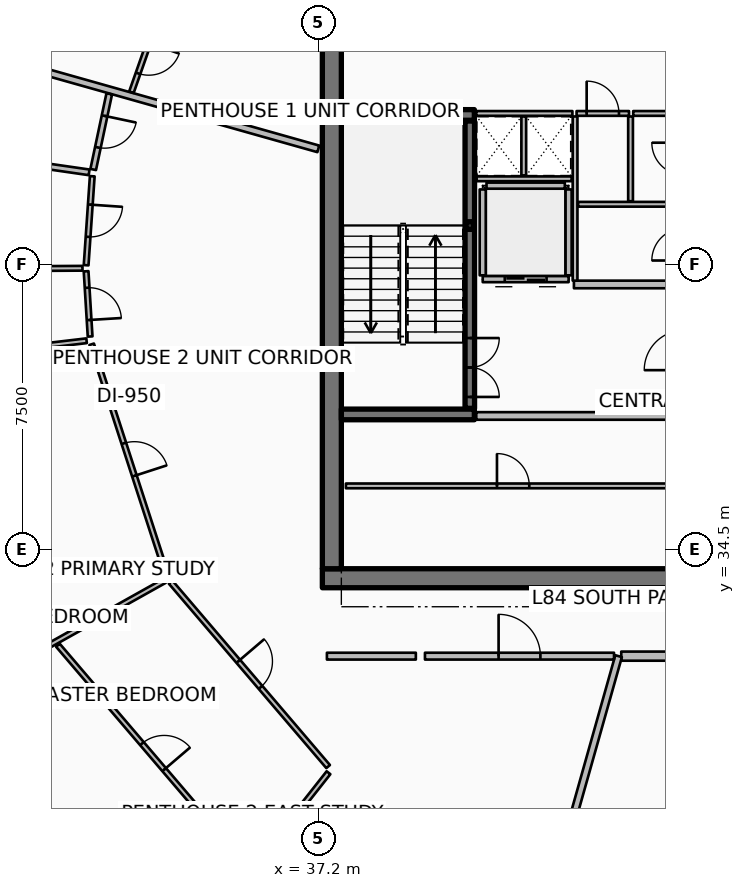
"""IFC4 building model, lengths in metres.
Left out: names, types, materials, properties, quantities, classifications, styles, units other than length and angle.
Written with IfcOpenShell. Run it as: python <this file> out.ifc"""

import sys

from ifc_helpers import new_model, si_unit, direction, frame, frame_2d, origin, origin_2d, place, context, subcontext, project, spatial, rectangle, hollow_rectangle, extrude, element, fill, save


model = new_model("IFC4")
c1 = context("Model", 3, precision=1e-05, world=origin(), true_north=direction((0.0, 1.0)))
c2 = subcontext(c1, "Body", "Model", "MODEL_VIEW")
j1 = project(units=[si_unit("LENGTHUNIT", "METRE"), si_unit("PLANEANGLEUNIT", "RADIAN")], contexts=[c1])
p1 = place(None, origin())
s1 = spatial("IfcSite", under=j1, at=p1, CompositionType="ELEMENT")
p2 = place(p1, origin())
s2 = spatial("IfcBuilding", under=s1, at=p2, CompositionType="ELEMENT")
p3 = place(p2, frame((0.0, 0.0, 334.7)))
s3 = spatial("IfcBuildingStorey", under=s2, at=p3, CompositionType="ELEMENT", Elevation=334.7)
p4 = place(p3, frame((37.3, 33.75, 0.0), z_axis=(0.0, 0.0, 1.0), x_axis=(1.0, 0.0, 0.0)))
e1 = element("IfcWall", 1, at=p4, inside=s3, PredefinedType="SHEAR", context=c2, shape_type="SweptSolid", body=[
    extrude(rectangle(XDim=9.6, YDim=0.5, at=frame_2d((4.8, 0.0))), origin(), (0.0, 0.0, 1.0), 4.2),
])
p5 = place(p3, frame((37.55, 34.0, 0.0), z_axis=(0.0, 0.0, 1.0), x_axis=(0.0, 1.0, 0.0)))
e2 = element("IfcWall", 2, at=p5, inside=s3, PredefinedType="SHEAR", context=c2, shape_type="SweptSolid", body=[
    extrude(rectangle(XDim=16.0, YDim=0.5, at=frame_2d((8.0, 0.0))), origin(), (0.0, 0.0, 1.0), 4.2),
])
for number, where, z_axis, x_axis in (
    (3, (37.8, 38.06, 0.0), (0.0, 0.0, 1.0), (1.0, 0.0, 0.0)),
    (4, (37.8, 45.94, 0.0), (0.0, 0.0, 1.0), (1.0, 0.0, 0.0)),
):
    element("IfcWall", number, at=place(p3, frame(where, z_axis=z_axis, x_axis=x_axis)), inside=s3, PredefinedType="SHEAR", context=c2, shape_type="SweptSolid", body=[
        extrude(rectangle(XDim=3.5, YDim=0.28, at=frame_2d((1.75, 0.0))), origin(), (0.0, 0.0, 1.0), 4.2),
    ])
p6 = place(p3, frame((41.18, 43.03, 0.0), z_axis=(0.0, 0.0, 1.0), x_axis=(1.0, 0.0, 0.0)))
e5 = element("IfcColumn", 5, at=p6, inside=s3, PredefinedType="COLUMN", context=c2, shape_type="SweptSolid", body=[
    extrude(hollow_rectangle(XDim=0.2, YDim=0.2, WallThickness=0.01, InnerFilletRadius=0.01, OuterFilletRadius=0.02, at=origin_2d()), origin(), (0.0, 0.0, 1.0), 1.895),
])
p7 = place(p3, frame((41.18, 38.22, 0.0), z_axis=(0.0, 0.0, 1.0), x_axis=(0.0, 1.0, 0.0)))
e6 = element("IfcWall", 6, at=p7, inside=s3, PredefinedType="SOLIDWALL", context=c2, shape_type="SweptSolid", body=[
    extrude(rectangle(XDim=7.56, YDim=0.25, at=frame_2d((3.78, 0.0))), origin(), (0.0, 0.0, 1.0), 3.94),
])
p8 = place(p7, frame((0.3, 0.0, 0.0)))
e7 = element("IfcOpeningElement", 7, at=p8, cuts=e6, PredefinedType="OPENING", context=c2, shape_type="SweptSolid", body=[
    extrude(rectangle(XDim=1.55, YDim=2.15, at=frame_2d((0.775, 1.075))), frame((0.0, 0.135, 0.0), z_axis=(0.0, -1.0, 0.0), x_axis=(1.0, 0.0, 0.0)), (0.0, 0.0, 1.0), 0.27),
])
p9 = place(p3, frame((43.78, 41.62, 0.0), z_axis=(0.0, 0.0, 1.0), x_axis=(-1.0, 0.0, 0.0)))
e8 = element("IfcWall", 8, at=p9, inside=s3, PredefinedType="PARTITIONING", context=c2, shape_type="SweptSolid", body=[
    extrude(rectangle(XDim=2.26, YDim=0.16, at=frame_2d((1.13, 0.0))), origin(), (0.0, 0.0, 1.0), 3.94),
])
p10 = place(p9, frame((0.58, 0.0, 0.0)))
e9 = element("IfcOpeningElement", 9, at=p10, cuts=e8, PredefinedType="OPENING", context=c2, shape_type="SweptSolid", body=[
    extrude(rectangle(XDim=1.1, YDim=2.1, at=frame_2d((0.55, 1.05))), frame((0.0, 0.09, 0.0), z_axis=(0.0, -1.0, 0.0), x_axis=(1.0, 0.0, 0.0)), (0.0, 0.0, 1.0), 0.18),
])
for number, where, z_axis, x_axis in (
    (10, (43.78, 41.72, 0.0), (0.0, 0.0, 1.0), (0.0, 1.0, 0.0)),
    (11, (41.52, 41.72, 0.0), (0.0, 0.0, 1.0), (0.0, 1.0, 0.0)),
):
    element("IfcWall", number, at=place(p3, frame(where, z_axis=z_axis, x_axis=x_axis)), inside=s3, PredefinedType="PARTITIONING", context=c2, shape_type="SweptSolid", body=[
        extrude(rectangle(XDim=2.26, YDim=0.16, at=frame_2d((1.13, 0.0))), origin(), (0.0, 0.0, 1.0), 3.94),
    ])
p11 = place(p3, frame((41.62, 44.08, 0.0), z_axis=(0.0, 0.0, 1.0), x_axis=(1.0, 0.0, 0.0)))
e12 = element("IfcWall", 12, at=p11, inside=s3, PredefinedType="PARTITIONING", context=c2, shape_type="SweptSolid", body=[
    extrude(rectangle(XDim=2.06, YDim=0.16, at=frame_2d((1.03, 0.0))), origin(), (0.0, 0.0, 1.0), 3.94),
])
p12 = place(p3, frame((37.92, 36.18, 0.0), z_axis=(0.0, 0.0, 1.0), x_axis=(1.0, 0.0, 0.0)))
e13 = element("IfcWall", 13, at=p12, inside=s3, PredefinedType="PARTITIONING", context=c2, shape_type="SweptSolid", body=[
    extrude(rectangle(XDim=8.8, YDim=0.125, at=frame_2d((4.4, 0.0))), origin(), (0.0, 0.0, 1.0), 3.38),
])
p13 = place(p12, frame((3.975, 0.0, 0.0)))
e14 = element("IfcOpeningElement", 14, at=p13, cuts=e13, PredefinedType="OPENING", context=c2, shape_type="SweptSolid", body=[
    extrude(rectangle(XDim=0.85, YDim=2.06, at=frame_2d((0.425, 1.03))), frame((0.0, 0.073, 0.0), z_axis=(0.0, -1.0, 0.0), x_axis=(1.0, 0.0, 0.0)), (0.0, 0.0, 1.0), 0.145),
])
p14 = place(p3, frame((41.35, 38.02, 0.0), z_axis=(0.0, 0.0, 1.0), x_axis=(1.0, 0.0, 0.0)))
e15 = element("IfcWall", 15, at=p14, inside=s3, PredefinedType="PARTITIONING", context=c2, shape_type="SweptSolid", body=[
    extrude(rectangle(XDim=5.37, YDim=0.2, at=frame_2d((2.685, 0.0))), origin(), (0.0, 0.0, 1.0), 3.94),
])
p15 = place(p3, frame((43.92, 41.48, 0.0), z_axis=(0.0, 0.0, 1.0), x_axis=(1.0, 0.0, 0.0)))
e16 = element("IfcWall", 16, at=p15, inside=s3, PredefinedType="PARTITIONING", context=c2, shape_type="SweptSolid", body=[
    extrude(rectangle(XDim=2.8, YDim=0.2, at=frame_2d((1.4, 0.0))), origin(), (0.0, 0.0, 1.0), 3.94),
])
p16 = place(p3, frame((41.36, 44.26, 0.0), z_axis=(0.0, 0.0, 1.0), x_axis=(1.0, 0.0, 0.0)))
e17 = element("IfcWall", 17, at=p16, inside=s3, PredefinedType="PARTITIONING", context=c2, shape_type="SweptSolid", body=[
    extrude(rectangle(XDim=2.5, YDim=0.125, at=frame_2d((1.25, 0.0))), origin(), (0.0, 0.0, 1.0), 3.38),
])
p17 = place(p3, frame((42.6, 44.35, 0.0), z_axis=(0.0, 0.0, 1.0), x_axis=(0.0, 1.0, 0.0)))
e18 = element("IfcWall", 18, at=p17, inside=s3, PredefinedType="PARTITIONING", context=c2, shape_type="SweptSolid", body=[
    extrude(rectangle(XDim=1.55, YDim=0.125, at=frame_2d((0.775, 0.0))), origin(), (0.0, 0.0, 1.0), 3.38),
])
p18 = place(p3, frame((43.95, 41.58, 0.0), z_axis=(0.0, 0.0, 1.0), x_axis=(0.0, 1.0, 0.0)))
e19 = element("IfcWall", 19, at=p18, inside=s3, PredefinedType="PARTITIONING", context=c2, shape_type="SweptSolid", body=[
    extrude(rectangle(XDim=4.32, YDim=0.125, at=frame_2d((2.16, 0.0))), origin(), (0.0, 0.0, 1.0), 3.38),
])
p19 = place(p3, frame((44.03, 43.59, 0.0), z_axis=(0.0, 0.0, 1.0), x_axis=(1.0, 0.0, 0.0)))
e20 = element("IfcWall", 20, at=p19, inside=s3, PredefinedType="PARTITIONING", context=c2, shape_type="SweptSolid", body=[
    extrude(rectangle(XDim=2.71, YDim=0.125, at=frame_2d((1.355, 0.0))), origin(), (0.0, 0.0, 1.0), 3.38),
])
p20 = place(p3, frame((45.41, 43.67, 0.0), z_axis=(0.0, 0.0, 1.0), x_axis=(0.0, 1.0, 0.0)))
e21 = element("IfcWall", 21, at=p20, inside=s3, PredefinedType="PARTITIONING", context=c2, shape_type="SweptSolid", body=[
    extrude(rectangle(XDim=2.23, YDim=0.125, at=frame_2d((1.115, 0.0))), origin(), (0.0, 0.0, 1.0), 3.38),
])
p21 = place(p3, frame((41.35, 45.98, 0.0), z_axis=(0.0, 0.0, 1.0), x_axis=(1.0, 0.0, 0.0)))
e22 = element("IfcWall", 22, at=p21, inside=s3, PredefinedType="PARTITIONING", context=c2, shape_type="SweptSolid", body=[
    extrude(rectangle(XDim=2.53, YDim=0.125, at=frame_2d((1.265, 0.0))), origin(), (0.0, 0.0, 1.0), 3.38),
])
p22 = place(p3, frame((43.99, 45.98, 0.0), z_axis=(0.0, 0.0, 1.0), x_axis=(1.0, 0.0, 0.0)))
e23 = element("IfcWall", 23, at=p22, inside=s3, PredefinedType="PARTITIONING", context=c2, shape_type="SweptSolid", body=[
    extrude(rectangle(XDim=1.38, YDim=0.125, at=frame_2d((0.69, 0.0))), origin(), (0.0, 0.0, 1.0), 3.38),
])
p23 = place(p22, frame((0.265, 0.0, 0.0)))
e24 = element("IfcOpeningElement", 24, at=p23, cuts=e23, PredefinedType="OPENING", context=c2, shape_type="SweptSolid", body=[
    extrude(rectangle(XDim=0.85, YDim=2.06, at=frame_2d((0.425, 1.03))), frame((0.0, 0.073, 0.0), z_axis=(0.0, -1.0, 0.0), x_axis=(1.0, 0.0, 0.0)), (0.0, 0.0, 1.0), 0.145),
])
p24 = place(p3, frame((45.48, 45.98, 0.0), z_axis=(0.0, 0.0, 1.0), x_axis=(1.0, 0.0, 0.0)))
e25 = element("IfcWall", 25, at=p24, inside=s3, PredefinedType="PARTITIONING", context=c2, shape_type="SweptSolid", body=[
    extrude(rectangle(XDim=1.26, YDim=0.125, at=frame_2d((0.63, 0.0))), origin(), (0.0, 0.0, 1.0), 3.38),
])
p25 = place(p3, frame((45.165, 31.7, 0.0), z_axis=(0.0, 0.0, 1.0), x_axis=(1.0, 0.0, 0.0)))
e26 = element("IfcWall", 26, at=p25, inside=s3, PredefinedType="SOLIDWALL", context=c2, shape_type="SweptSolid", body=[
    extrude(rectangle(XDim=8.533, YDim=0.24, at=frame_2d((4.267, 0.0))), origin(), (0.0, 0.0, 1.0), 3.38),
])
p26 = place(p3, frame((37.194, 45.048, 0.0), z_axis=(0.0, 0.0, 1.0), x_axis=(-0.962457024049, 0.271434111451, 0.0)))
e27 = element("IfcWall", 27, at=p26, inside=s3, PredefinedType="PARTITIONING", context=c2, shape_type="SweptSolid", body=[
    extrude(rectangle(XDim=13.799, YDim=0.18, at=frame_2d((6.9, 0.0))), origin(), (0.0, 0.0, 1.0), 3.38),
])
p27 = place(p3, frame((45.095, 31.7, 0.0), z_axis=(0.0, 0.0, 1.0), x_axis=(-0.271453030279, -0.962451688321, 0.0)))
e28 = element("IfcWall", 28, at=p27, inside=s3, PredefinedType="PARTITIONING", context=c2, shape_type="SweptSolid", body=[
    extrude(rectangle(XDim=12.191, YDim=0.18, at=frame_2d((6.096, 0.0))), origin(), (0.0, 0.0, 1.0), 3.38),
])
p28 = place(p3, frame((32.907, 48.332, 0.0), z_axis=(0.0, 0.0, 1.0), x_axis=(-0.332128336942, -0.943234206229, 0.0)))
e29 = element("IfcWall", 29, at=p28, inside=s3, PredefinedType="PARTITIONING", context=c2, shape_type="SweptSolid", body=[
    extrude(rectangle(XDim=1.902, YDim=0.125, at=frame_2d((0.951, 0.0))), origin(), (0.0, 0.0, 1.0), 3.38),
])
p29 = place(p28, frame((0.526, 0.0, 0.0)))
e30 = element("IfcOpeningElement", 30, at=p29, cuts=e29, PredefinedType="OPENING", context=c2, shape_type="SweptSolid", body=[
    extrude(rectangle(XDim=0.85, YDim=2.06, at=frame_2d((0.425, 1.03))), frame((0.0, 0.073, 0.0), z_axis=(0.0, -1.0, 0.0), x_axis=(1.0, 0.0, 0.0)), (0.0, 0.0, 1.0), 0.145),
])
p30 = place(p3, frame((40.0, 31.7, 0.0), z_axis=(0.0, 0.0, 1.0), x_axis=(1.0, 0.0, 0.0)))
e31 = element("IfcWall", 31, at=p30, inside=s3, PredefinedType="PARTITIONING", context=c2, shape_type="SweptSolid", body=[
    extrude(rectangle(XDim=4.975, YDim=0.18, at=frame_2d((2.488, 0.0))), origin(), (0.0, 0.0, 1.0), 3.38),
])
p31 = place(p30, frame((1.938, 0.0, 0.0)))
e32 = element("IfcOpeningElement", 32, at=p31, cuts=e31, PredefinedType="OPENING", context=c2, shape_type="SweptSolid", body=[
    extrude(rectangle(XDim=1.1, YDim=2.1, at=frame_2d((0.55, 1.05))), frame((0.0, 0.1, 0.0), z_axis=(0.0, -1.0, 0.0), x_axis=(1.0, 0.0, 0.0)), (0.0, 0.0, 1.0), 0.2),
])
p32 = place(p3, frame((31.692, 46.496, 0.0), z_axis=(0.0, 0.0, 1.0), x_axis=(-0.207455496804, -0.978244456588, 0.0)))
e33 = element("IfcWall", 33, at=p32, inside=s3, PredefinedType="PARTITIONING", context=c2, shape_type="SweptSolid", body=[
    extrude(rectangle(XDim=2.035, YDim=0.15, at=frame_2d((1.017, 0.0))), origin(), (0.0, 0.0, 1.0), 3.38),
])
p33 = place(p32, frame((0.592, 0.0, 0.0)))
e34 = element("IfcOpeningElement", 34, at=p33, cuts=e33, PredefinedType="OPENING", context=c2, shape_type="SweptSolid", body=[
    extrude(rectangle(XDim=0.85, YDim=2.06, at=frame_2d((0.425, 1.03))), frame((0.0, 0.085, 0.0), z_axis=(0.0, -1.0, 0.0), x_axis=(1.0, 0.0, 0.0)), (0.0, 0.0, 1.0), 0.17),
])
p34 = place(p3, frame((31.162, 44.43, 0.0), z_axis=(0.0, 0.0, 1.0), x_axis=(-0.989744304981, 0.142850308916, 0.0)))
e35 = element("IfcWall", 35, at=p34, inside=s3, PredefinedType="PARTITIONING", context=c2, shape_type="SweptSolid", body=[
    extrude(rectangle(XDim=4.09, YDim=0.15, at=frame_2d((2.045, 0.0))), origin(), (0.0, 0.0, 1.0), 3.38),
])
p35 = place(p3, frame((30.988, 41.906, 0.0), z_axis=(0.0, 0.0, 1.0), x_axis=(-0.999984908948, -0.005493803382, 0.0)))
e36 = element("IfcWall", 36, at=p35, inside=s3, PredefinedType="PARTITIONING", context=c2, shape_type="SweptSolid", body=[
    extrude(rectangle(XDim=8.666, YDim=0.125, at=frame_2d((4.333, 0.0))), origin(), (0.0, 0.0, 1.0), 3.38),
])
p36 = place(p3, frame((31.245, 44.327, 0.0), z_axis=(0.0, 0.0, 1.0), x_axis=(-0.068873502497, -0.997625400967, 0.0)))
e37 = element("IfcWall", 37, at=p36, inside=s3, PredefinedType="PARTITIONING", context=c2, shape_type="SweptSolid", body=[
    extrude(rectangle(XDim=2.347, YDim=0.125, at=frame_2d((1.173, 0.0))), origin(), (0.0, 0.0, 1.0), 3.38),
])
p37 = place(p36, frame((0.748, 0.0, 0.0)))
e38 = element("IfcOpeningElement", 38, at=p37, cuts=e37, PredefinedType="OPENING", context=c2, shape_type="SweptSolid", body=[
    extrude(rectangle(XDim=0.85, YDim=2.06, at=frame_2d((0.425, 1.03))), frame((0.0, 0.073, 0.0), z_axis=(0.0, -1.0, 0.0), x_axis=(1.0, 0.0, 0.0)), (0.0, 0.0, 1.0), 0.145),
])
p38 = place(p3, frame((31.083, 41.827, 0.0), z_axis=(0.0, 0.0, 1.0), x_axis=(0.061626842896, -0.998099259711, 0.0)))
e39 = element("IfcWall", 39, at=p38, inside=s3, PredefinedType="PARTITIONING", context=c2, shape_type="SweptSolid", body=[
    extrude(rectangle(XDim=1.719, YDim=0.125, at=frame_2d((0.86, 0.0))), origin(), (0.0, 0.0, 1.0), 3.38),
])
p39 = place(p38, frame((0.435, 0.0, 0.0)))
e40 = element("IfcOpeningElement", 40, at=p39, cuts=e39, PredefinedType="OPENING", context=c2, shape_type="SweptSolid", body=[
    extrude(rectangle(XDim=0.85, YDim=2.06, at=frame_2d((0.425, 1.03))), frame((0.0, 0.073, 0.0), z_axis=(0.0, -1.0, 0.0), x_axis=(1.0, 0.0, 0.0)), (0.0, 0.0, 1.0), 0.145),
])
p40 = place(p3, frame((31.096, 39.999, 0.0), z_axis=(0.0, 0.0, 1.0), x_axis=(-0.993069250604, -0.117530691761, 0.0)))
e41 = element("IfcWall", 41, at=p40, inside=s3, PredefinedType="PARTITIONING", context=c2, shape_type="SweptSolid", body=[
    extrude(rectangle(XDim=8.814, YDim=0.125, at=frame_2d((4.407, 0.0))), origin(), (0.0, 0.0, 1.0), 3.38),
])
p41 = place(p3, frame((31.229, 39.906, 0.0), z_axis=(0.0, 0.0, 1.0), x_axis=(0.309023798792, -0.951054305379, 0.0)))
e42 = element("IfcWall", 42, at=p41, inside=s3, PredefinedType="PARTITIONING", context=c2, shape_type="SweptSolid", body=[
    extrude(rectangle(XDim=6.383, YDim=0.125, at=frame_2d((3.191, 0.0))), origin(), (0.0, 0.0, 1.0), 3.38),
])
p42 = place(p41, frame((2.741, 0.0, 0.0)))
e43 = element("IfcOpeningElement", 43, at=p42, cuts=e42, PredefinedType="OPENING", context=c2, shape_type="SweptSolid", body=[
    extrude(rectangle(XDim=0.9, YDim=2.08, at=frame_2d((0.45, 1.04))), frame((0.0, 0.073, 0.0), z_axis=(0.0, -1.0, 0.0), x_axis=(1.0, 0.0, 0.0)), (0.0, 0.0, 1.0), 0.145),
])
p43 = place(p3, frame((37.42, 31.7, 0.0), z_axis=(0.0, 0.0, 1.0), x_axis=(1.0, 0.0, 0.0)))
e44 = element("IfcWall", 44, at=p43, inside=s3, PredefinedType="PARTITIONING", context=c2, shape_type="SweptSolid", body=[
    extrude(rectangle(XDim=2.34, YDim=0.18, at=frame_2d((1.17, 0.0))), origin(), (0.0, 0.0, 1.0), 3.38),
])
p44 = place(p3, frame((33.148, 33.683, 0.0), z_axis=(0.0, 0.0, 1.0), x_axis=(-0.872504598877, -0.488605899409, 0.0)))
e45 = element("IfcWall", 45, at=p44, inside=s3, PredefinedType="PARTITIONING", context=c2, shape_type="SweptSolid", body=[
    extrude(rectangle(XDim=8.814, YDim=0.125, at=frame_2d((4.407, 0.0))), origin(), (0.0, 0.0, 1.0), 3.38),
])
p45 = place(p3, frame((37.462, 28.632, 0.0), z_axis=(0.0, 0.0, 1.0), x_axis=(-0.619099165969, -0.78531281837, 0.0)))
e46 = element("IfcWall", 46, at=p45, inside=s3, PredefinedType="PARTITIONING", context=c2, shape_type="SweptSolid", body=[
    extrude(rectangle(XDim=8.105, YDim=0.125, at=frame_2d((4.052, 0.0))), origin(), (0.0, 0.0, 1.0), 3.38),
])
p46 = place(p3, frame((33.307, 33.648, 0.0), z_axis=(0.0, 0.0, 1.0), x_axis=(0.649467421322, -0.760389419075, 0.0)))
e47 = element("IfcWall", 47, at=p46, inside=s3, PredefinedType="PARTITIONING", context=c2, shape_type="SweptSolid", body=[
    extrude(rectangle(XDim=6.383, YDim=0.125, at=frame_2d((3.191, 0.0))), origin(), (0.0, 0.0, 1.0), 3.38),
])
p47 = place(p46, frame((2.741, 0.0, 0.0)))
e48 = element("IfcOpeningElement", 48, at=p47, cuts=e47, PredefinedType="OPENING", context=c2, shape_type="SweptSolid", body=[
    extrude(rectangle(XDim=0.9, YDim=2.08, at=frame_2d((0.45, 1.04))), frame((0.0, 0.073, 0.0), z_axis=(0.0, -1.0, 0.0), x_axis=(1.0, 0.0, 0.0)), (0.0, 0.0, 1.0), 0.145),
])
p48 = place(p3, frame((30.341, 31.987, 0.0), z_axis=(0.0, 0.0, 1.0), x_axis=(0.649457620817, -0.760397789819, 0.0)))
e49 = element("IfcWall", 49, at=p48, inside=s3, PredefinedType="PARTITIONING", context=c2, shape_type="SweptSolid", body=[
    extrude(rectangle(XDim=7.709, YDim=0.125, at=frame_2d((3.854, 0.0))), origin(), (0.0, 0.0, 1.0), 3.38),
])
p49 = place(p48, frame((3.405, 0.0, 0.0)))
e50 = element("IfcOpeningElement", 50, at=p49, cuts=e49, PredefinedType="OPENING", context=c2, shape_type="SweptSolid", body=[
    extrude(rectangle(XDim=0.9, YDim=2.08, at=frame_2d((0.45, 1.04))), frame((0.0, 0.073, 0.0), z_axis=(0.0, -1.0, 0.0), x_axis=(1.0, 0.0, 0.0)), (0.0, 0.0, 1.0), 0.145),
])
p50 = place(p8, origin())
e51 = element("IfcDoor", 51, at=p50, inside=s3, OperationType="DOUBLE_DOOR_SINGLE_SWING", PredefinedType="DOOR", context=c2, shape_type="SweptSolid", body=[
    extrude(rectangle(XDim=1.55, YDim=2.15, at=frame_2d((0.775, 1.075))), frame((0.0, 0.025, 0.0), z_axis=(0.0, -1.0, 0.0), x_axis=(1.0, 0.0, 0.0)), (0.0, 0.0, 1.0), 0.05),
])
fill(e7, e51)
p51 = place(p10, origin())
e52 = element("IfcDoor", 52, at=p51, inside=s3, OperationType="DOUBLE_DOOR_SLIDING", PredefinedType="DOOR", context=c2, shape_type="SweptSolid", body=[
    extrude(rectangle(XDim=1.1, YDim=2.1, at=frame_2d((0.55, 1.05))), frame((0.0, 0.025, 0.0), z_axis=(0.0, -1.0, 0.0), x_axis=(1.0, 0.0, 0.0)), (0.0, 0.0, 1.0), 0.05),
])
fill(e9, e52)
p52 = place(p13, origin())
e53 = element("IfcDoor", 53, at=p52, inside=s3, OperationType="SINGLE_SWING_LEFT", PredefinedType="DOOR", context=c2, shape_type="SweptSolid", body=[
    extrude(rectangle(XDim=0.85, YDim=2.06, at=frame_2d((0.425, 1.03))), frame((0.0, 0.025, 0.0), z_axis=(0.0, -1.0, 0.0), x_axis=(1.0, 0.0, 0.0)), (0.0, 0.0, 1.0), 0.05),
])
fill(e14, e53)
p53 = place(p23, origin())
e54 = element("IfcDoor", 54, at=p53, inside=s3, OperationType="SINGLE_SWING_LEFT", PredefinedType="DOOR", context=c2, shape_type="SweptSolid", body=[
    extrude(rectangle(XDim=0.85, YDim=2.06, at=frame_2d((0.425, 1.03))), frame((0.0, 0.025, 0.0), z_axis=(0.0, -1.0, 0.0), x_axis=(1.0, 0.0, 0.0)), (0.0, 0.0, 1.0), 0.05),
])
fill(e24, e54)
p54 = place(p29, origin())
e55 = element("IfcDoor", 55, at=p54, inside=s3, OperationType="SINGLE_SWING_LEFT", PredefinedType="DOOR", context=c2, shape_type="SweptSolid", body=[
    extrude(rectangle(XDim=0.85, YDim=2.06, at=frame_2d((0.425, 1.03))), frame((0.0, 0.025, 0.0), z_axis=(0.0, -1.0, 0.0), x_axis=(1.0, 0.0, 0.0)), (0.0, 0.0, 1.0), 0.05),
])
fill(e30, e55)
p55 = place(p31, origin())
e56 = element("IfcDoor", 56, at=p55, inside=s3, OperationType="SINGLE_SWING_LEFT", PredefinedType="DOOR", context=c2, shape_type="SweptSolid", body=[
    extrude(rectangle(XDim=1.1, YDim=2.1, at=frame_2d((0.55, 1.05))), frame((0.0, 0.025, 0.0), z_axis=(0.0, -1.0, 0.0), x_axis=(1.0, 0.0, 0.0)), (0.0, 0.0, 1.0), 0.05),
])
fill(e32, e56)
p56 = place(p33, origin())
e57 = element("IfcDoor", 57, at=p56, inside=s3, OperationType="SINGLE_SWING_LEFT", PredefinedType="DOOR", context=c2, shape_type="SweptSolid", body=[
    extrude(rectangle(XDim=0.85, YDim=2.06, at=frame_2d((0.425, 1.03))), frame((0.0, 0.025, 0.0), z_axis=(0.0, -1.0, 0.0), x_axis=(1.0, 0.0, 0.0)), (0.0, 0.0, 1.0), 0.05),
])
fill(e34, e57)
p57 = place(p37, origin())
e58 = element("IfcDoor", 58, at=p57, inside=s3, OperationType="SINGLE_SWING_LEFT", PredefinedType="DOOR", context=c2, shape_type="SweptSolid", body=[
    extrude(rectangle(XDim=0.85, YDim=2.06, at=frame_2d((0.425, 1.03))), frame((0.0, 0.025, 0.0), z_axis=(0.0, -1.0, 0.0), x_axis=(1.0, 0.0, 0.0)), (0.0, 0.0, 1.0), 0.05),
])
fill(e38, e58)
p58 = place(p39, origin())
e59 = element("IfcDoor", 59, at=p58, inside=s3, OperationType="SINGLE_SWING_RIGHT", PredefinedType="DOOR", context=c2, shape_type="SweptSolid", body=[
    extrude(rectangle(XDim=0.85, YDim=2.06, at=frame_2d((0.425, 1.03))), frame((0.0, 0.025, 0.0), z_axis=(0.0, -1.0, 0.0), x_axis=(1.0, 0.0, 0.0)), (0.0, 0.0, 1.0), 0.05),
])
fill(e40, e59)
p59 = place(p42, origin())
e60 = element("IfcDoor", 60, at=p59, inside=s3, OperationType="SINGLE_SWING_RIGHT", PredefinedType="DOOR", context=c2, shape_type="SweptSolid", body=[
    extrude(rectangle(XDim=0.9, YDim=2.08, at=frame_2d((0.45, 1.04))), frame((0.0, 0.025, 0.0), z_axis=(0.0, -1.0, 0.0), x_axis=(1.0, 0.0, 0.0)), (0.0, 0.0, 1.0), 0.05),
])
fill(e43, e60)
p60 = place(p47, origin())
e61 = element("IfcDoor", 61, at=p60, inside=s3, OperationType="SINGLE_SWING_LEFT", PredefinedType="DOOR", context=c2, shape_type="SweptSolid", body=[
    extrude(rectangle(XDim=0.9, YDim=2.08, at=frame_2d((0.45, 1.04))), frame((0.0, 0.025, 0.0), z_axis=(0.0, -1.0, 0.0), x_axis=(1.0, 0.0, 0.0)), (0.0, 0.0, 1.0), 0.05),
])
fill(e48, e61)
p61 = place(p49, origin())
e62 = element("IfcDoor", 62, at=p61, inside=s3, OperationType="SINGLE_SWING_RIGHT", PredefinedType="DOOR", context=c2, shape_type="SweptSolid", body=[
    extrude(rectangle(XDim=0.9, YDim=2.08, at=frame_2d((0.45, 1.04))), frame((0.0, 0.025, 0.0), z_axis=(0.0, -1.0, 0.0), x_axis=(1.0, 0.0, 0.0)), (0.0, 0.0, 1.0), 0.05),
])
fill(e50, e62)
save(model, sys.argv[1])
